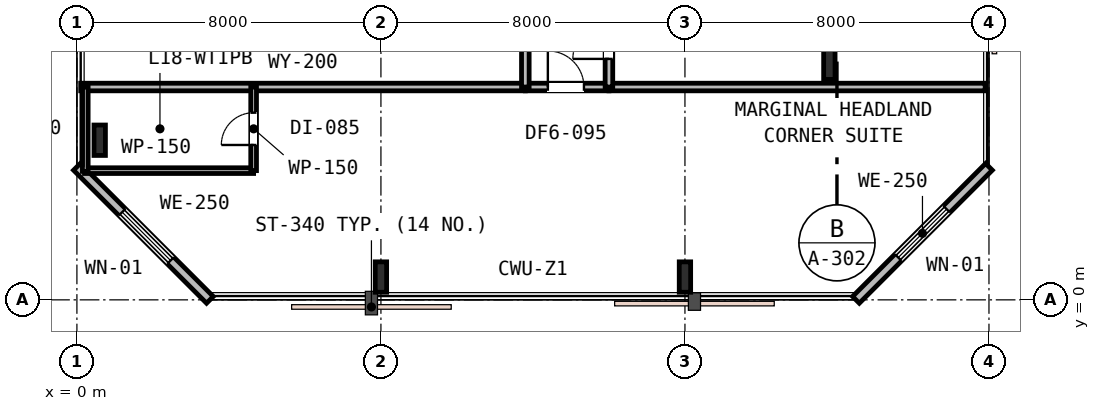
"""IFC4 building model, lengths in metres.
Left out: names, types, materials, properties, quantities, classifications, styles, units other than length and angle.
Written with IfcOpenShell. Run it as: python <this file> out.ifc"""

import sys

from ifc_helpers import new_model, si_unit, direction, frame, frame_2d, origin, origin_2d, place, context, subcontext, project, spatial, rectangle, i_section, extrude, element, fill, save


model = new_model("IFC4")
c1 = context("Model", 3, precision=1e-05, world=origin(), true_north=direction((0.0, 1.0)))
c2 = subcontext(c1, "Body", "Model", "MODEL_VIEW")
j1 = project(units=[si_unit("LENGTHUNIT", "METRE"), si_unit("PLANEANGLEUNIT", "RADIAN")], contexts=[c1])
p1 = place(None, origin())
s1 = spatial("IfcSite", under=j1, at=p1, CompositionType="ELEMENT")
p2 = place(p1, origin())
s2 = spatial("IfcBuilding", under=s1, at=p2, CompositionType="ELEMENT")
p3 = place(p2, frame((0.0, 0.0, 72.6)))
s3 = spatial("IfcBuildingStorey", under=s2, at=p3, CompositionType="ELEMENT", Elevation=72.6)
for number, where, z_axis, x_axis in (
    (1, (0.6, 4.2, 0.0), (0.0, 0.0, 1.0), (1.0, 0.0, 0.0)),
    (2, (8.0, 0.6, 0.0), (0.0, 0.0, 1.0), (1.0, 0.0, 0.0)),
    (3, (16.0, 0.6, 0.0), (0.0, 0.0, 1.0), (1.0, 0.0, 0.0)),
    (4, (19.8, 6.2, 0.0), (0.0, 0.0, 1.0), (1.0, 0.0, 0.0)),
):
    element("IfcColumn", number, at=place(p3, frame(where, z_axis=z_axis, x_axis=x_axis)), inside=s3, PredefinedType="COLUMN", context=c2, shape_type="SweptSolid", body=[
        extrude(i_section(OverallWidth=0.3, OverallDepth=0.8, WebThickness=0.018, FlangeThickness=0.033, FilletRadius=0.03, at=origin_2d()), origin(), (0.0, 0.0, 1.0), 3.6),
    ])
p4 = place(p3, frame((20.5, 0.0, 0.0), z_axis=(0.0, 0.0, 1.0), x_axis=(0.707106781187, 0.707106781187, 0.0)))
e5 = element("IfcWall", 5, at=p4, inside=s3, PredefinedType="STANDARD", context=c2, shape_type="SweptSolid", body=[
    extrude(rectangle(XDim=4.95, YDim=0.25, at=frame_2d((2.475, 0.0))), origin(), (0.0, 0.0, 1.0), 3.33),
])
p5 = place(p4, frame((1.575, 0.0, 0.75)))
e6 = element("IfcOpeningElement", 6, at=p5, cuts=e5, PredefinedType="OPENING", context=c2, shape_type="SweptSolid", body=[
    extrude(rectangle(XDim=1.8, YDim=1.85, at=frame_2d((0.9, 0.925))), frame((0.0, 0.135, 0.0), z_axis=(0.0, -1.0, 0.0), x_axis=(1.0, 0.0, 0.0)), (0.0, 0.0, 1.0), 0.27),
])
p6 = place(p3, frame((0.0, 3.5, 0.0), z_axis=(0.0, 0.0, 1.0), x_axis=(0.707106781187, -0.707106781187, 0.0)))
e7 = element("IfcWall", 7, at=p6, inside=s3, PredefinedType="STANDARD", context=c2, shape_type="SweptSolid", body=[
    extrude(rectangle(XDim=4.95, YDim=0.25, at=frame_2d((2.475, 0.0))), origin(), (0.0, 0.0, 1.0), 3.33),
])
p7 = place(p6, frame((1.685, 0.0, 0.75)))
e8 = element("IfcOpeningElement", 8, at=p7, cuts=e7, PredefinedType="OPENING", context=c2, shape_type="SweptSolid", body=[
    extrude(rectangle(XDim=1.8, YDim=1.85, at=frame_2d((0.9, 0.925))), frame((0.0, 0.135, 0.0), z_axis=(0.0, -1.0, 0.0), x_axis=(1.0, 0.0, 0.0)), (0.0, 0.0, 1.0), 0.27),
])
p8 = place(p3, frame((0.1, 5.6, 0.0), z_axis=(0.0, 0.0, 1.0), x_axis=(1.0, 0.0, 0.0)))
e9 = element("IfcWall", 9, at=p8, inside=s3, PredefinedType="PARTITIONING", context=c2, shape_type="SweptSolid", body=[
    extrude(rectangle(XDim=11.7, YDim=0.2, at=frame_2d((5.85, 0.0))), origin(), (0.0, 0.0, 1.0), 2.92),
])
p9 = place(p3, frame((14.0, 5.6, 0.0), z_axis=(0.0, 0.0, 1.0), x_axis=(1.0, 0.0, 0.0)))
e10 = element("IfcWall", 10, at=p9, inside=s3, PredefinedType="PARTITIONING", context=c2, shape_type="SweptSolid", body=[
    extrude(rectangle(XDim=9.9, YDim=0.2, at=frame_2d((4.95, 0.0))), origin(), (0.0, 0.0, 1.0), 2.83),
])
p10 = place(p3, frame((11.8, 5.6, 0.0), z_axis=(0.0, 0.0, 1.0), x_axis=(1.0, 0.0, 0.0)))
e11 = element("IfcWall", 11, at=p10, inside=s3, PredefinedType="PARTITIONING", context=c2, shape_type="SweptSolid", body=[
    extrude(rectangle(XDim=2.2, YDim=0.2, at=frame_2d((1.1, 0.0))), origin(), (0.0, 0.0, 1.0), 3.33),
])
p11 = place(p10, frame((0.593, 0.0, 0.0)))
e12 = element("IfcOpeningElement", 12, at=p11, cuts=e11, PredefinedType="OPENING", context=c2, shape_type="SweptSolid", body=[
    extrude(rectangle(XDim=0.95, YDim=2.15, at=frame_2d((0.475, 1.075))), frame((0.0, 0.11, 0.0), z_axis=(0.0, -1.0, 0.0), x_axis=(1.0, 0.0, 0.0)), (0.0, 0.0, 1.0), 0.22),
])
p12 = place(p3, frame((0.2, 3.4, 0.0), z_axis=(0.0, 0.0, 1.0), x_axis=(1.0, 0.0, 0.0)))
e13 = element("IfcWall", 13, at=p12, inside=s3, PredefinedType="PARTITIONING", context=c2, shape_type="SweptSolid", body=[
    extrude(rectangle(XDim=4.45, YDim=0.15, at=frame_2d((2.225, 0.0))), origin(), (0.0, 0.0, 1.0), 3.33),
])
p13 = place(p3, frame((4.65, 3.4, 0.0), z_axis=(0.0, 0.0, 1.0), x_axis=(0.0, 1.0, 0.0)))
e14 = element("IfcWall", 14, at=p13, inside=s3, PredefinedType="PARTITIONING", context=c2, shape_type="SweptSolid", body=[
    extrude(rectangle(XDim=2.2, YDim=0.15, at=frame_2d((1.1, 0.0))), origin(), (0.0, 0.0, 1.0), 3.33),
])
p14 = place(p13, frame((0.675, 0.0, 0.0)))
e15 = element("IfcOpeningElement", 15, at=p14, cuts=e14, PredefinedType="OPENING", context=c2, shape_type="SweptSolid", body=[
    extrude(rectangle(XDim=0.85, YDim=2.15, at=frame_2d((0.425, 1.075))), frame((0.0, 0.085, 0.0), z_axis=(0.0, -1.0, 0.0), x_axis=(1.0, 0.0, 0.0)), (0.0, 0.0, 1.0), 0.17),
])
p15 = place(p3, frame((0.22, 3.38, 0.0), z_axis=(0.0, 0.0, 1.0), x_axis=(0.0, 1.0, 0.0)))
e16 = element("IfcWall", 16, at=p15, inside=s3, PredefinedType="PARTITIONING", context=c2, shape_type="SweptSolid", body=[
    extrude(rectangle(XDim=2.22, YDim=0.15, at=frame_2d((1.11, 0.0))), origin(), (0.0, 0.0, 1.0), 2.92),
])
p16 = place(p3, frame((11.8, 5.6, 0.0), z_axis=(0.0, 0.0, 1.0), x_axis=(0.0, 1.0, 0.0)))
e17 = element("IfcWall", 17, at=p16, inside=s3, PredefinedType="PARTITIONING", context=c2, shape_type="SweptSolid", body=[
    extrude(rectangle(XDim=23.0, YDim=0.2, at=frame_2d((11.5, 0.0))), origin(), (0.0, 0.0, 1.0), 2.83),
])
p17 = place(p16, frame((1.2, 0.0, 0.0)))
e18 = element("IfcOpeningElement", 18, at=p17, cuts=e17, PredefinedType="OPENING", context=c2, shape_type="SweptSolid", body=[
    extrude(rectangle(XDim=0.95, YDim=2.15, at=frame_2d((0.475, 1.075))), frame((0.0, 0.11, 0.0), z_axis=(0.0, -1.0, 0.0), x_axis=(1.0, 0.0, 0.0)), (0.0, 0.0, 1.0), 0.22),
])
p18 = place(p16, frame((7.0, 0.0, 0.0)))
e19 = element("IfcOpeningElement", 19, at=p18, cuts=e17, PredefinedType="OPENING", context=c2, shape_type="SweptSolid", body=[
    extrude(rectangle(XDim=0.95, YDim=2.15, at=frame_2d((0.475, 1.075))), frame((0.0, 0.11, 0.0), z_axis=(0.0, -1.0, 0.0), x_axis=(1.0, 0.0, 0.0)), (0.0, 0.0, 1.0), 0.22),
])
p19 = place(p16, frame((12.8, 0.0, 0.0)))
e20 = element("IfcOpeningElement", 20, at=p19, cuts=e17, PredefinedType="OPENING", context=c2, shape_type="SweptSolid", body=[
    extrude(rectangle(XDim=0.95, YDim=2.15, at=frame_2d((0.475, 1.075))), frame((0.0, 0.11, 0.0), z_axis=(0.0, -1.0, 0.0), x_axis=(1.0, 0.0, 0.0)), (0.0, 0.0, 1.0), 0.22),
])
p20 = place(p16, frame((18.515, 0.0, 0.0)))
e21 = element("IfcOpeningElement", 21, at=p20, cuts=e17, PredefinedType="OPENING", context=c2, shape_type="SweptSolid", body=[
    extrude(rectangle(XDim=0.95, YDim=2.15, at=frame_2d((0.475, 1.075))), frame((0.0, 0.11, 0.0), z_axis=(0.0, -1.0, 0.0), x_axis=(1.0, 0.0, 0.0)), (0.0, 0.0, 1.0), 0.22),
])
p21 = place(p3, frame((14.0, 5.6, 0.0), z_axis=(0.0, 0.0, 1.0), x_axis=(0.0, 1.0, 0.0)))
e22 = element("IfcWall", 22, at=p21, inside=s3, PredefinedType="PARTITIONING", context=c2, shape_type="SweptSolid", body=[
    extrude(rectangle(XDim=23.0, YDim=0.2, at=frame_2d((11.5, 0.0))), origin(), (0.0, 0.0, 1.0), 2.83),
])
p22 = place(p21, frame((0.74, 0.0, 0.0)))
e23 = element("IfcOpeningElement", 23, at=p22, cuts=e22, PredefinedType="OPENING", context=c2, shape_type="SweptSolid", body=[
    extrude(rectangle(XDim=0.95, YDim=2.15, at=frame_2d((0.475, 1.075))), frame((0.0, 0.11, 0.0), z_axis=(0.0, -1.0, 0.0), x_axis=(1.0, 0.0, 0.0)), (0.0, 0.0, 1.0), 0.22),
])
p23 = place(p21, frame((6.271, 0.0, 0.0)))
e24 = element("IfcOpeningElement", 24, at=p23, cuts=e22, PredefinedType="OPENING", context=c2, shape_type="SweptSolid", body=[
    extrude(rectangle(XDim=0.95, YDim=2.15, at=frame_2d((0.475, 1.075))), frame((0.0, 0.11, 0.0), z_axis=(0.0, -1.0, 0.0), x_axis=(1.0, 0.0, 0.0)), (0.0, 0.0, 1.0), 0.22),
])
p24 = place(p21, frame((13.626, 0.0, 0.0)))
e25 = element("IfcOpeningElement", 25, at=p24, cuts=e22, PredefinedType="OPENING", context=c2, shape_type="SweptSolid", body=[
    extrude(rectangle(XDim=0.95, YDim=2.15, at=frame_2d((0.475, 1.075))), frame((0.0, 0.11, 0.0), z_axis=(0.0, -1.0, 0.0), x_axis=(1.0, 0.0, 0.0)), (0.0, 0.0, 1.0), 0.22),
])
p25 = place(p21, frame((20.393, 0.0, 0.0)))
e26 = element("IfcOpeningElement", 26, at=p25, cuts=e22, PredefinedType="OPENING", context=c2, shape_type="SweptSolid", body=[
    extrude(rectangle(XDim=0.95, YDim=2.15, at=frame_2d((0.475, 1.075))), frame((0.0, 0.11, 0.0), z_axis=(0.0, -1.0, 0.0), x_axis=(1.0, 0.0, 0.0)), (0.0, 0.0, 1.0), 0.22),
])
p26 = place(p5, origin())
e27 = element("IfcWindow", 27, at=p26, inside=s3, PartitioningType="SINGLE_PANEL", PredefinedType="WINDOW", context=c2, shape_type="SweptSolid", body=[
    extrude(rectangle(XDim=1.8, YDim=1.85, at=frame_2d((0.9, 0.925))), frame((0.0, 0.03, 0.0), z_axis=(0.0, -1.0, 0.0), x_axis=(1.0, 0.0, 0.0)), (0.0, 0.0, 1.0), 0.06),
])
fill(e6, e27)
p27 = place(p7, origin())
e28 = element("IfcWindow", 28, at=p27, inside=s3, PartitioningType="SINGLE_PANEL", PredefinedType="WINDOW", context=c2, shape_type="SweptSolid", body=[
    extrude(rectangle(XDim=1.8, YDim=1.85, at=frame_2d((0.9, 0.925))), frame((0.0, 0.03, 0.0), z_axis=(0.0, -1.0, 0.0), x_axis=(1.0, 0.0, 0.0)), (0.0, 0.0, 1.0), 0.06),
])
fill(e8, e28)
p28 = place(p11, origin())
e29 = element("IfcDoor", 29, at=p28, inside=s3, OperationType="SINGLE_SWING_LEFT", PredefinedType="DOOR", context=c2, shape_type="SweptSolid", body=[
    extrude(rectangle(XDim=0.95, YDim=2.15, at=frame_2d((0.475, 1.075))), frame((0.0, 0.025, 0.0), z_axis=(0.0, -1.0, 0.0), x_axis=(1.0, 0.0, 0.0)), (0.0, 0.0, 1.0), 0.05),
])
fill(e12, e29)
p29 = place(p14, origin())
e30 = element("IfcDoor", 30, at=p29, inside=s3, OperationType="SINGLE_SWING_LEFT", PredefinedType="DOOR", context=c2, shape_type="SweptSolid", body=[
    extrude(rectangle(XDim=0.85, YDim=2.15, at=frame_2d((0.425, 1.075))), frame((0.0, 0.025, 0.0), z_axis=(0.0, -1.0, 0.0), x_axis=(1.0, 0.0, 0.0)), (0.0, 0.0, 1.0), 0.05),
])
fill(e15, e30)
p30 = place(p22, origin())
e31 = element("IfcDoor", 31, at=p30, inside=s3, OperationType="SINGLE_SWING_LEFT", PredefinedType="DOOR", context=c2, shape_type="SweptSolid", body=[
    extrude(rectangle(XDim=0.95, YDim=2.15, at=frame_2d((0.475, 1.075))), frame((0.0, 0.025, 0.0), z_axis=(0.0, -1.0, 0.0), x_axis=(1.0, 0.0, 0.0)), (0.0, 0.0, 1.0), 0.05),
])
fill(e23, e31)
save(model, sys.argv[1])
